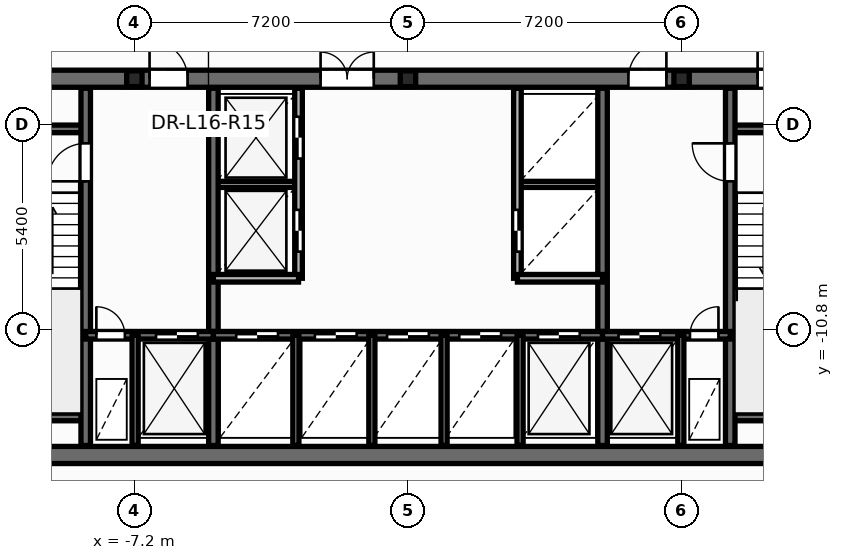
"""IFC4 building model, lengths in metres.
Left out: names, types, materials, properties, quantities, classifications, styles, units other than length and angle.
Written with IfcOpenShell. Run it as: python <this file> out.ifc"""

import sys

from ifc_helpers import new_model, si_unit, direction, frame, frame_2d, origin, origin_2d, place, context, subcontext, project, spatial, rectangle, i_section, extrude, element, fill, save


model = new_model("IFC4")
c1 = context("Model", 3, precision=1e-05, world=origin(), true_north=direction((0.0, 1.0)))
c2 = subcontext(c1, "Body", "Model", "MODEL_VIEW")
j1 = project(units=[si_unit("LENGTHUNIT", "METRE"), si_unit("PLANEANGLEUNIT", "RADIAN")], contexts=[c1])
p1 = place(None, origin())
s1 = spatial("IfcSite", under=j1, at=p1, CompositionType="ELEMENT")
p2 = place(p1, origin())
s2 = spatial("IfcBuilding", under=s1, at=p2, CompositionType="ELEMENT")
p3 = place(p2, frame((0.0, 0.0, 64.8)))
s3 = spatial("IfcBuildingStorey", under=s2, at=p3, CompositionType="ELEMENT", Elevation=64.8)
for number, where, z_axis, x_axis in (
    (1, (-7.2, -4.2, 0.0), (0.0, 0.0, 1.0), (1.0, 0.0, 0.0)),
    (2, (0.0, -4.2, 0.0), (0.0, 0.0, 1.0), (1.0, 0.0, 0.0)),
    (3, (7.2, -4.2, 0.0), (0.0, 0.0, 1.0), (1.0, 0.0, 0.0)),
):
    element("IfcColumn", number, at=place(p3, frame(where, z_axis=z_axis, x_axis=x_axis)), inside=s3, PredefinedType="PILASTER", context=c2, shape_type="SweptSolid", body=[
        extrude(i_section(OverallWidth=0.405, OverallDepth=0.414, WebThickness=0.022, FlangeThickness=0.032, at=origin_2d()), origin(), (0.0, 0.0, 1.0), 3.6),
    ])
for number, where, z_axis, x_axis in (
    (4, (-5.12, -6.98, 0.0), (0.0, 0.0, 1.0), (1.0, 0.0, 0.0)),
    (5, (2.88, -6.98, 0.0), (0.0, 0.0, 1.0), (1.0, 0.0, 0.0)),
):
    element("IfcWall", number, at=place(p3, frame(where, z_axis=z_axis, x_axis=x_axis)), inside=s3, PredefinedType="PARTITIONING", context=c2, shape_type="SweptSolid", body=[
        extrude(rectangle(XDim=2.24, YDim=0.16, at=frame_2d((1.12, 0.0))), origin(), (0.0, 0.0, 1.0), 3.35),
    ])
p4 = place(p3, frame((-12.65, -14.1, 0.0), z_axis=(0.0, 0.0, 1.0), x_axis=(1.0, 0.0, 0.0)))
e6 = element("IfcWall", 6, at=p4, inside=s3, PredefinedType="SHEAR", context=c2, shape_type="SweptSolid", body=[
    extrude(rectangle(XDim=25.3, YDim=0.45, at=frame_2d((12.65, 0.0))), origin(), (0.0, 0.0, 1.0), 3.6),
])
p5 = place(p3, frame((-12.65, -4.2, 0.0), z_axis=(0.0, 0.0, 1.0), x_axis=(1.0, 0.0, 0.0)))
e7 = element("IfcWall", 7, at=p5, inside=s3, PredefinedType="SHEAR", context=c2, shape_type="SweptSolid", body=[
    extrude(rectangle(XDim=25.3, YDim=0.45, at=frame_2d((12.65, 0.0))), origin(), (0.0, 0.0, 1.0), 3.6),
])
p6 = place(p5, frame((1.85, 0.0, 0.0)))
e8 = element("IfcOpeningElement", 8, at=p6, cuts=e7, PredefinedType="OPENING", context=c2, shape_type="SweptSolid", body=[
    extrude(rectangle(XDim=0.756, YDim=2.054, at=frame_2d((0.375, 1.027))), frame((0.0, 0.235, 0.0), z_axis=(0.0, -1.0, 0.0), x_axis=(1.0, 0.0, 0.0)), (0.0, 0.0, 1.0), 0.47),
])
p7 = place(p5, frame((21.85, 0.0, 0.0)))
e9 = element("IfcOpeningElement", 9, at=p7, cuts=e7, PredefinedType="OPENING", context=c2, shape_type="SweptSolid", body=[
    extrude(rectangle(XDim=0.756, YDim=2.054, at=frame_2d((0.375, 1.027))), frame((0.0, 0.235, 0.0), z_axis=(0.0, -1.0, 0.0), x_axis=(1.0, 0.0, 0.0)), (0.0, 0.0, 1.0), 0.47),
])
p8 = place(p5, frame((23.5, 0.0, 0.0)))
e10 = element("IfcOpeningElement", 10, at=p8, cuts=e7, PredefinedType="OPENING", context=c2, shape_type="SweptSolid", body=[
    extrude(rectangle(XDim=0.756, YDim=2.054, at=frame_2d((0.375, 1.027))), frame((0.0, 0.235, 0.0), z_axis=(0.0, -1.0, 0.0), x_axis=(1.0, 0.0, 0.0)), (0.0, 0.0, 1.0), 0.47),
])
p9 = place(p5, frame((5.85, 0.0, 0.0)))
e11 = element("IfcOpeningElement", 11, at=p9, cuts=e7, PredefinedType="OPENING", context=c2, shape_type="SweptSolid", body=[
    extrude(rectangle(XDim=1.006, YDim=2.104, at=frame_2d((0.5, 1.052))), frame((0.0, 0.235, 0.0), z_axis=(0.0, -1.0, 0.0), x_axis=(1.0, 0.0, 0.0)), (0.0, 0.0, 1.0), 0.47),
])
p10 = place(p5, frame((10.35, 0.0, 0.0)))
e12 = element("IfcOpeningElement", 12, at=p10, cuts=e7, PredefinedType="OPENING", context=c2, shape_type="SweptSolid", body=[
    extrude(rectangle(XDim=1.406, YDim=2.154, at=frame_2d((0.7, 1.077))), frame((0.0, 0.235, 0.0), z_axis=(0.0, -1.0, 0.0), x_axis=(1.0, 0.0, 0.0)), (0.0, 0.0, 1.0), 0.47),
])
p11 = place(p5, frame((18.45, 0.0, 0.0)))
e13 = element("IfcOpeningElement", 13, at=p11, cuts=e7, PredefinedType="OPENING", context=c2, shape_type="SweptSolid", body=[
    extrude(rectangle(XDim=1.006, YDim=2.104, at=frame_2d((0.5, 1.052))), frame((0.0, 0.235, 0.0), z_axis=(0.0, -1.0, 0.0), x_axis=(1.0, 0.0, 0.0)), (0.0, 0.0, 1.0), 0.47),
])
for number, where, z_axis, x_axis in (
    (14, (-12.35, -5.52, 0.0), (0.0, 0.0, 1.0), (1.0, 0.0, 0.0)),
    (15, (-12.35, -13.1, 0.0), (0.0, 0.0, 1.0), (1.0, 0.0, 0.0)),
    (16, (8.48, -5.52, 0.0), (0.0, 0.0, 1.0), (1.0, 0.0, 0.0)),
    (17, (8.48, -13.1, 0.0), (0.0, 0.0, 1.0), (1.0, 0.0, 0.0)),
):
    element("IfcWall", number, at=place(p3, frame(where, z_axis=z_axis, x_axis=x_axis)), inside=s3, PredefinedType="SOLIDWALL", context=c2, shape_type="SweptSolid", body=[
        extrude(rectangle(XDim=3.87, YDim=0.2, at=frame_2d((1.935, 0.0))), origin(), (0.0, 0.0, 1.0), 3.6),
    ])
p12 = place(p3, frame((-8.48, -13.85, 0.0), z_axis=(0.0, 0.0, 1.0), x_axis=(0.0, 1.0, 0.0)))
e18 = element("IfcWall", 18, at=p12, inside=s3, PredefinedType="SHEAR", context=c2, shape_type="SweptSolid", body=[
    extrude(rectangle(XDim=9.4, YDim=0.25, at=frame_2d((4.7, 0.0))), origin(), (0.0, 0.0, 1.0), 3.6),
])
p13 = place(p12, frame((6.95, 0.0, 0.0)))
e19 = element("IfcOpeningElement", 19, at=p13, cuts=e18, PredefinedType="OPENING", context=c2, shape_type="SweptSolid", body=[
    extrude(rectangle(XDim=1.006, YDim=2.104, at=frame_2d((0.5, 1.052))), frame((0.0, 0.135, 0.0), z_axis=(0.0, -1.0, 0.0), x_axis=(1.0, 0.0, 0.0)), (0.0, 0.0, 1.0), 0.27),
])
p14 = place(p3, frame((8.48, -13.85, 0.0), z_axis=(0.0, 0.0, 1.0), x_axis=(0.0, 1.0, 0.0)))
e20 = element("IfcWall", 20, at=p14, inside=s3, PredefinedType="SHEAR", context=c2, shape_type="SweptSolid", body=[
    extrude(rectangle(XDim=9.4, YDim=0.25, at=frame_2d((4.7, 0.0))), origin(), (0.0, 0.0, 1.0), 3.6),
])
p15 = place(p14, frame((6.95, 0.0, 0.0)))
e21 = element("IfcOpeningElement", 21, at=p15, cuts=e20, PredefinedType="OPENING", context=c2, shape_type="SweptSolid", body=[
    extrude(rectangle(XDim=1.006, YDim=2.104, at=frame_2d((0.5, 1.052))), frame((0.0, 0.135, 0.0), z_axis=(0.0, -1.0, 0.0), x_axis=(1.0, 0.0, 0.0)), (0.0, 0.0, 1.0), 0.27),
])
for number, where, z_axis, x_axis in (
    (22, (-5.12, -13.85, 0.0), (0.0, 0.0, 1.0), (0.0, 1.0, 0.0)),
    (23, (5.12, -13.85, 0.0), (0.0, 0.0, 1.0), (0.0, 1.0, 0.0)),
):
    element("IfcWall", number, at=place(p3, frame(where, z_axis=z_axis, x_axis=x_axis)), inside=s3, PredefinedType="SHEAR", context=c2, shape_type="SweptSolid", body=[
        extrude(rectangle(XDim=9.4, YDim=0.25, at=frame_2d((4.7, 0.0))), origin(), (0.0, 0.0, 1.0), 3.6),
    ])
p16 = place(p3, frame((-8.48, -10.95, 0.0), z_axis=(0.0, 0.0, 1.0), x_axis=(1.0, 0.0, 0.0)))
e24 = element("IfcWall", 24, at=p16, inside=s3, PredefinedType="SOLIDWALL", context=c2, shape_type="SweptSolid", body=[
    extrude(rectangle(XDim=3.36, YDim=0.2, at=frame_2d((1.68, 0.0))), origin(), (0.0, 0.0, 1.0), 3.6),
])
p17 = place(p16, frame((0.28, 0.0, 0.0)))
e25 = element("IfcOpeningElement", 25, at=p17, cuts=e24, PredefinedType="OPENING", context=c2, shape_type="SweptSolid", body=[
    extrude(rectangle(XDim=0.756, YDim=2.054, at=frame_2d((0.375, 1.027))), frame((0.0, 0.11, 0.0), z_axis=(0.0, -1.0, 0.0), x_axis=(1.0, 0.0, 0.0)), (0.0, 0.0, 1.0), 0.22),
])
p18 = place(p16, frame((1.85, 0.0, 0.0)))
e26 = element("IfcOpeningElement", 26, at=p18, cuts=e24, PredefinedType="OPENING", context=c2, shape_type="SweptSolid", body=[
    extrude(rectangle(XDim=1.106, YDim=2.104, at=frame_2d((0.55, 1.052))), frame((0.0, 0.11, 0.0), z_axis=(0.0, -1.0, 0.0), x_axis=(1.0, 0.0, 0.0)), (0.0, 0.0, 1.0), 0.22),
])
p19 = place(p3, frame((-5.12, -10.95, 0.0), z_axis=(0.0, 0.0, 1.0), x_axis=(1.0, 0.0, 0.0)))
e27 = element("IfcWall", 27, at=p19, inside=s3, PredefinedType="SOLIDWALL", context=c2, shape_type="SweptSolid", body=[
    extrude(rectangle(XDim=10.24, YDim=0.2, at=frame_2d((5.12, 0.0))), origin(), (0.0, 0.0, 1.0), 3.6),
])
p20 = place(p19, frame((0.6, 0.0, 0.0)))
e28 = element("IfcOpeningElement", 28, at=p20, cuts=e27, PredefinedType="OPENING", context=c2, shape_type="SweptSolid", body=[
    extrude(rectangle(XDim=1.106, YDim=2.104, at=frame_2d((0.55, 1.052))), frame((0.0, 0.11, 0.0), z_axis=(0.0, -1.0, 0.0), x_axis=(1.0, 0.0, 0.0)), (0.0, 0.0, 1.0), 0.22),
])
p21 = place(p19, frame((2.67, 0.0, 0.0)))
e29 = element("IfcOpeningElement", 29, at=p21, cuts=e27, PredefinedType="OPENING", context=c2, shape_type="SweptSolid", body=[
    extrude(rectangle(XDim=1.106, YDim=2.104, at=frame_2d((0.55, 1.052))), frame((0.0, 0.11, 0.0), z_axis=(0.0, -1.0, 0.0), x_axis=(1.0, 0.0, 0.0)), (0.0, 0.0, 1.0), 0.22),
])
p22 = place(p19, frame((4.57, 0.0, 0.0)))
e30 = element("IfcOpeningElement", 30, at=p22, cuts=e27, PredefinedType="OPENING", context=c2, shape_type="SweptSolid", body=[
    extrude(rectangle(XDim=1.106, YDim=2.104, at=frame_2d((0.55, 1.052))), frame((0.0, 0.11, 0.0), z_axis=(0.0, -1.0, 0.0), x_axis=(1.0, 0.0, 0.0)), (0.0, 0.0, 1.0), 0.22),
])
p23 = place(p19, frame((6.47, 0.0, 0.0)))
e31 = element("IfcOpeningElement", 31, at=p23, cuts=e27, PredefinedType="OPENING", context=c2, shape_type="SweptSolid", body=[
    extrude(rectangle(XDim=1.106, YDim=2.104, at=frame_2d((0.55, 1.052))), frame((0.0, 0.11, 0.0), z_axis=(0.0, -1.0, 0.0), x_axis=(1.0, 0.0, 0.0)), (0.0, 0.0, 1.0), 0.22),
])
p24 = place(p19, frame((8.54, 0.0, 0.0)))
e32 = element("IfcOpeningElement", 32, at=p24, cuts=e27, PredefinedType="OPENING", context=c2, shape_type="SweptSolid", body=[
    extrude(rectangle(XDim=1.106, YDim=2.104, at=frame_2d((0.55, 1.052))), frame((0.0, 0.11, 0.0), z_axis=(0.0, -1.0, 0.0), x_axis=(1.0, 0.0, 0.0)), (0.0, 0.0, 1.0), 0.22),
])
p25 = place(p3, frame((5.12, -10.95, 0.0), z_axis=(0.0, 0.0, 1.0), x_axis=(1.0, 0.0, 0.0)))
e33 = element("IfcWall", 33, at=p25, inside=s3, PredefinedType="SOLIDWALL", context=c2, shape_type="SweptSolid", body=[
    extrude(rectangle(XDim=3.36, YDim=0.2, at=frame_2d((1.68, 0.0))), origin(), (0.0, 0.0, 1.0), 3.6),
])
p26 = place(p25, frame((0.42, 0.0, 0.0)))
e34 = element("IfcOpeningElement", 34, at=p26, cuts=e33, PredefinedType="OPENING", context=c2, shape_type="SweptSolid", body=[
    extrude(rectangle(XDim=1.106, YDim=2.104, at=frame_2d((0.55, 1.052))), frame((0.0, 0.11, 0.0), z_axis=(0.0, -1.0, 0.0), x_axis=(1.0, 0.0, 0.0)), (0.0, 0.0, 1.0), 0.22),
])
p27 = place(p25, frame((2.3, 0.0, 0.0)))
e35 = element("IfcOpeningElement", 35, at=p27, cuts=e33, PredefinedType="OPENING", context=c2, shape_type="SweptSolid", body=[
    extrude(rectangle(XDim=0.756, YDim=2.054, at=frame_2d((0.375, 1.027))), frame((0.0, 0.11, 0.0), z_axis=(0.0, -1.0, 0.0), x_axis=(1.0, 0.0, 0.0)), (0.0, 0.0, 1.0), 0.22),
])
for number, where, z_axis, x_axis in (
    (36, (-7.18, -13.85, 0.0), (0.0, 0.0, 1.0), (0.0, 1.0, 0.0)),
    (37, (7.18, -13.85, 0.0), (0.0, 0.0, 1.0), (0.0, 1.0, 0.0)),
    (38, (-2.95, -13.85, 0.0), (0.0, 0.0, 1.0), (0.0, 1.0, 0.0)),
    (39, (2.95, -13.85, 0.0), (0.0, 0.0, 1.0), (0.0, 1.0, 0.0)),
):
    element("IfcWall", number, at=place(p3, frame(where, z_axis=z_axis, x_axis=x_axis)), inside=s3, PredefinedType="PARTITIONING", context=c2, shape_type="SweptSolid", body=[
        extrude(rectangle(XDim=2.9, YDim=0.16, at=frame_2d((1.45, 0.0))), origin(), (0.0, 0.0, 1.0), 2.375),
    ])
p28 = place(p3, frame((-2.88, -9.45, 0.0), z_axis=(0.0, 0.0, 1.0), x_axis=(0.0, 1.0, 0.0)))
e40 = element("IfcWall", 40, at=p28, inside=s3, PredefinedType="SOLIDWALL", context=c2, shape_type="SweptSolid", body=[
    extrude(rectangle(XDim=5.0, YDim=0.2, at=frame_2d((2.5, 0.0))), origin(), (0.0, 0.0, 1.0), 3.35),
])
p29 = place(p28, frame((0.7, 0.0, 0.0)))
e41 = element("IfcOpeningElement", 41, at=p29, cuts=e40, PredefinedType="OPENING", context=c2, shape_type="SweptSolid", body=[
    extrude(rectangle(XDim=1.106, YDim=2.104, at=frame_2d((0.55, 1.052))), frame((0.0, 0.11, 0.0), z_axis=(0.0, -1.0, 0.0), x_axis=(1.0, 0.0, 0.0)), (0.0, 0.0, 1.0), 0.22),
])
p30 = place(p28, frame((3.15, 0.0, 0.0)))
e42 = element("IfcOpeningElement", 42, at=p30, cuts=e40, PredefinedType="OPENING", context=c2, shape_type="SweptSolid", body=[
    extrude(rectangle(XDim=1.106, YDim=2.104, at=frame_2d((0.55, 1.052))), frame((0.0, 0.11, 0.0), z_axis=(0.0, -1.0, 0.0), x_axis=(1.0, 0.0, 0.0)), (0.0, 0.0, 1.0), 0.22),
])
p31 = place(p3, frame((-5.12, -9.45, 0.0), z_axis=(0.0, 0.0, 1.0), x_axis=(1.0, 0.0, 0.0)))
e43 = element("IfcWall", 43, at=p31, inside=s3, PredefinedType="SOLIDWALL", context=c2, shape_type="SweptSolid", body=[
    extrude(rectangle(XDim=2.24, YDim=0.2, at=frame_2d((1.12, 0.0))), origin(), (0.0, 0.0, 1.0), 3.35),
])
p32 = place(p3, frame((2.88, -9.45, 0.0), z_axis=(0.0, 0.0, 1.0), x_axis=(0.0, 1.0, 0.0)))
e44 = element("IfcWall", 44, at=p32, inside=s3, PredefinedType="SOLIDWALL", context=c2, shape_type="SweptSolid", body=[
    extrude(rectangle(XDim=5.0, YDim=0.2, at=frame_2d((2.5, 0.0))), origin(), (0.0, 0.0, 1.0), 3.35),
])
p33 = place(p32, frame((0.7, 0.0, 0.0)))
e45 = element("IfcOpeningElement", 45, at=p33, cuts=e44, PredefinedType="OPENING", context=c2, shape_type="SweptSolid", body=[
    extrude(rectangle(XDim=1.106, YDim=2.104, at=frame_2d((0.55, 1.052))), frame((0.0, 0.11, 0.0), z_axis=(0.0, -1.0, 0.0), x_axis=(1.0, 0.0, 0.0)), (0.0, 0.0, 1.0), 0.22),
])
p34 = place(p3, frame((2.88, -9.45, 0.0), z_axis=(0.0, 0.0, 1.0), x_axis=(1.0, 0.0, 0.0)))
e46 = element("IfcWall", 46, at=p34, inside=s3, PredefinedType="SOLIDWALL", context=c2, shape_type="SweptSolid", body=[
    extrude(rectangle(XDim=2.24, YDim=0.2, at=frame_2d((1.12, 0.0))), origin(), (0.0, 0.0, 1.0), 3.35),
])
for number, where, z_axis, x_axis in (
    (47, (-0.95, -13.85, 0.0), (0.0, 0.0, 1.0), (0.0, 1.0, 0.0)),
    (48, (0.95, -13.85, 0.0), (0.0, 0.0, 1.0), (0.0, 1.0, 0.0)),
):
    element("IfcWall", number, at=place(p3, frame(where, z_axis=z_axis, x_axis=x_axis)), inside=s3, PredefinedType="PARTITIONING", context=c2, shape_type="SweptSolid", body=[
        extrude(rectangle(XDim=2.9, YDim=0.16, at=frame_2d((1.45, 0.0))), origin(), (0.0, 0.0, 1.0), 2.375),
    ])
p35 = place(p29, origin())
e49 = element("IfcDoor", 49, at=p35, inside=s3, OperationType="DOUBLE_DOOR_SLIDING", PredefinedType="DOOR", context=c2, shape_type="SweptSolid", body=[
    extrude(rectangle(XDim=1.1, YDim=2.1, at=frame_2d((0.55, 1.05))), frame((0.0, 0.025, 0.0), z_axis=(0.0, -1.0, 0.0), x_axis=(1.0, 0.0, 0.0)), (0.0, 0.0, 1.0), 0.05),
])
fill(e41, e49)
p36 = place(p30, origin())
e50 = element("IfcDoor", 50, at=p36, inside=s3, OperationType="DOUBLE_DOOR_SLIDING", PredefinedType="DOOR", context=c2, shape_type="SweptSolid", body=[
    extrude(rectangle(XDim=1.1, YDim=2.1, at=frame_2d((0.55, 1.05))), frame((0.0, 0.025, 0.0), z_axis=(0.0, -1.0, 0.0), x_axis=(1.0, 0.0, 0.0)), (0.0, 0.0, 1.0), 0.05),
])
fill(e42, e50)
p37 = place(p33, origin())
e51 = element("IfcDoor", 51, at=p37, inside=s3, OperationType="DOUBLE_DOOR_SLIDING", PredefinedType="DOOR", context=c2, shape_type="SweptSolid", body=[
    extrude(rectangle(XDim=1.1, YDim=2.1, at=frame_2d((0.55, 1.05))), frame((0.0, 0.025, 0.0), z_axis=(0.0, -1.0, 0.0), x_axis=(1.0, 0.0, 0.0)), (0.0, 0.0, 1.0), 0.05),
])
fill(e45, e51)
p38 = place(p13, origin())
e52 = element("IfcDoor", 52, at=p38, inside=s3, OperationType="SINGLE_SWING_LEFT", PredefinedType="DOOR", context=c2, shape_type="SweptSolid", body=[
    extrude(rectangle(XDim=1.0, YDim=2.1, at=frame_2d((0.5, 1.05))), frame((0.0, 0.025, 0.0), z_axis=(0.0, -1.0, 0.0), x_axis=(1.0, 0.0, 0.0)), (0.0, 0.0, 1.0), 0.05),
])
fill(e19, e52)
p39 = place(p15, origin())
e53 = element("IfcDoor", 53, at=p39, inside=s3, OperationType="SINGLE_SWING_RIGHT", PredefinedType="DOOR", context=c2, shape_type="SweptSolid", body=[
    extrude(rectangle(XDim=1.0, YDim=2.1, at=frame_2d((0.5, 1.05))), frame((0.0, 0.025, 0.0), z_axis=(0.0, -1.0, 0.0), x_axis=(1.0, 0.0, 0.0)), (0.0, 0.0, 1.0), 0.05),
])
fill(e21, e53)
p40 = place(p17, origin())
e54 = element("IfcDoor", 54, at=p40, inside=s3, OperationType="SINGLE_SWING_LEFT", PredefinedType="DOOR", context=c2, shape_type="SweptSolid", body=[
    extrude(rectangle(XDim=0.75, YDim=2.05, at=frame_2d((0.375, 1.025))), frame((0.0, 0.025, 0.0), z_axis=(0.0, -1.0, 0.0), x_axis=(1.0, 0.0, 0.0)), (0.0, 0.0, 1.0), 0.05),
])
fill(e25, e54)
p41 = place(p18, origin())
e55 = element("IfcDoor", 55, at=p41, inside=s3, OperationType="DOUBLE_DOOR_SLIDING", PredefinedType="DOOR", context=c2, shape_type="SweptSolid", body=[
    extrude(rectangle(XDim=1.1, YDim=2.1, at=frame_2d((0.55, 1.05))), frame((0.0, 0.025, 0.0), z_axis=(0.0, -1.0, 0.0), x_axis=(1.0, 0.0, 0.0)), (0.0, 0.0, 1.0), 0.05),
])
fill(e26, e55)
p42 = place(p26, origin())
e56 = element("IfcDoor", 56, at=p42, inside=s3, OperationType="DOUBLE_DOOR_SLIDING", PredefinedType="DOOR", context=c2, shape_type="SweptSolid", body=[
    extrude(rectangle(XDim=1.1, YDim=2.1, at=frame_2d((0.55, 1.05))), frame((0.0, 0.025, 0.0), z_axis=(0.0, -1.0, 0.0), x_axis=(1.0, 0.0, 0.0)), (0.0, 0.0, 1.0), 0.05),
])
fill(e34, e56)
p43 = place(p27, origin())
e57 = element("IfcDoor", 57, at=p43, inside=s3, OperationType="SINGLE_SWING_RIGHT", PredefinedType="DOOR", context=c2, shape_type="SweptSolid", body=[
    extrude(rectangle(XDim=0.75, YDim=2.05, at=frame_2d((0.375, 1.025))), frame((0.0, 0.025, 0.0), z_axis=(0.0, -1.0, 0.0), x_axis=(1.0, 0.0, 0.0)), (0.0, 0.0, 1.0), 0.05),
])
fill(e35, e57)
p44 = place(p20, origin())
e58 = element("IfcDoor", 58, at=p44, inside=s3, OperationType="DOUBLE_DOOR_SLIDING", PredefinedType="DOOR", context=c2, shape_type="SweptSolid", body=[
    extrude(rectangle(XDim=1.1, YDim=2.1, at=frame_2d((0.55, 1.05))), frame((0.0, 0.025, 0.0), z_axis=(0.0, -1.0, 0.0), x_axis=(1.0, 0.0, 0.0)), (0.0, 0.0, 1.0), 0.05),
])
fill(e28, e58)
p45 = place(p21, origin())
e59 = element("IfcDoor", 59, at=p45, inside=s3, OperationType="DOUBLE_DOOR_SLIDING", PredefinedType="DOOR", context=c2, shape_type="SweptSolid", body=[
    extrude(rectangle(XDim=1.1, YDim=2.1, at=frame_2d((0.55, 1.05))), frame((0.0, 0.025, 0.0), z_axis=(0.0, -1.0, 0.0), x_axis=(1.0, 0.0, 0.0)), (0.0, 0.0, 1.0), 0.05),
])
fill(e29, e59)
p46 = place(p22, origin())
e60 = element("IfcDoor", 60, at=p46, inside=s3, OperationType="DOUBLE_DOOR_SLIDING", PredefinedType="DOOR", context=c2, shape_type="SweptSolid", body=[
    extrude(rectangle(XDim=1.1, YDim=2.1, at=frame_2d((0.55, 1.05))), frame((0.0, 0.025, 0.0), z_axis=(0.0, -1.0, 0.0), x_axis=(1.0, 0.0, 0.0)), (0.0, 0.0, 1.0), 0.05),
])
fill(e30, e60)
p47 = place(p23, origin())
e61 = element("IfcDoor", 61, at=p47, inside=s3, OperationType="DOUBLE_DOOR_SLIDING", PredefinedType="DOOR", context=c2, shape_type="SweptSolid", body=[
    extrude(rectangle(XDim=1.1, YDim=2.1, at=frame_2d((0.55, 1.05))), frame((0.0, 0.025, 0.0), z_axis=(0.0, -1.0, 0.0), x_axis=(1.0, 0.0, 0.0)), (0.0, 0.0, 1.0), 0.05),
])
fill(e31, e61)
p48 = place(p24, origin())
e62 = element("IfcDoor", 62, at=p48, inside=s3, OperationType="DOUBLE_DOOR_SLIDING", PredefinedType="DOOR", context=c2, shape_type="SweptSolid", body=[
    extrude(rectangle(XDim=1.1, YDim=2.1, at=frame_2d((0.55, 1.05))), frame((0.0, 0.025, 0.0), z_axis=(0.0, -1.0, 0.0), x_axis=(1.0, 0.0, 0.0)), (0.0, 0.0, 1.0), 0.05),
])
fill(e32, e62)
p49 = place(p7, origin())
e63 = element("IfcDoor", 63, at=p49, inside=s3, OperationType="SINGLE_SWING_LEFT", PredefinedType="DOOR", context=c2, shape_type="SweptSolid", body=[
    extrude(rectangle(XDim=0.75, YDim=2.05, at=frame_2d((0.375, 1.025))), frame((0.0, 0.025, 0.0), z_axis=(0.0, -1.0, 0.0), x_axis=(1.0, 0.0, 0.0)), (0.0, 0.0, 1.0), 0.05),
])
fill(e9, e63)
p50 = place(p9, origin())
e64 = element("IfcDoor", 64, at=p50, inside=s3, OperationType="SINGLE_SWING_LEFT", PredefinedType="DOOR", context=c2, shape_type="SweptSolid", body=[
    extrude(rectangle(XDim=1.0, YDim=2.1, at=frame_2d((0.5, 1.05))), frame((0.0, 0.025, 0.0), z_axis=(0.0, -1.0, 0.0), x_axis=(1.0, 0.0, 0.0)), (0.0, 0.0, 1.0), 0.05),
])
fill(e11, e64)
p51 = place(p10, origin())
e65 = element("IfcDoor", 65, at=p51, inside=s3, OperationType="DOUBLE_DOOR_SINGLE_SWING", PredefinedType="DOOR", context=c2, shape_type="SweptSolid", body=[
    extrude(rectangle(XDim=1.4, YDim=2.15, at=frame_2d((0.7, 1.075))), frame((0.0, 0.025, 0.0), z_axis=(0.0, -1.0, 0.0), x_axis=(1.0, 0.0, 0.0)), (0.0, 0.0, 1.0), 0.05),
])
fill(e12, e65)
p52 = place(p11, origin())
e66 = element("IfcDoor", 66, at=p52, inside=s3, OperationType="SINGLE_SWING_RIGHT", PredefinedType="DOOR", context=c2, shape_type="SweptSolid", body=[
    extrude(rectangle(XDim=1.0, YDim=2.1, at=frame_2d((0.5, 1.05))), frame((0.0, 0.025, 0.0), z_axis=(0.0, -1.0, 0.0), x_axis=(1.0, 0.0, 0.0)), (0.0, 0.0, 1.0), 0.05),
])
fill(e13, e66)
save(model, sys.argv[1])
